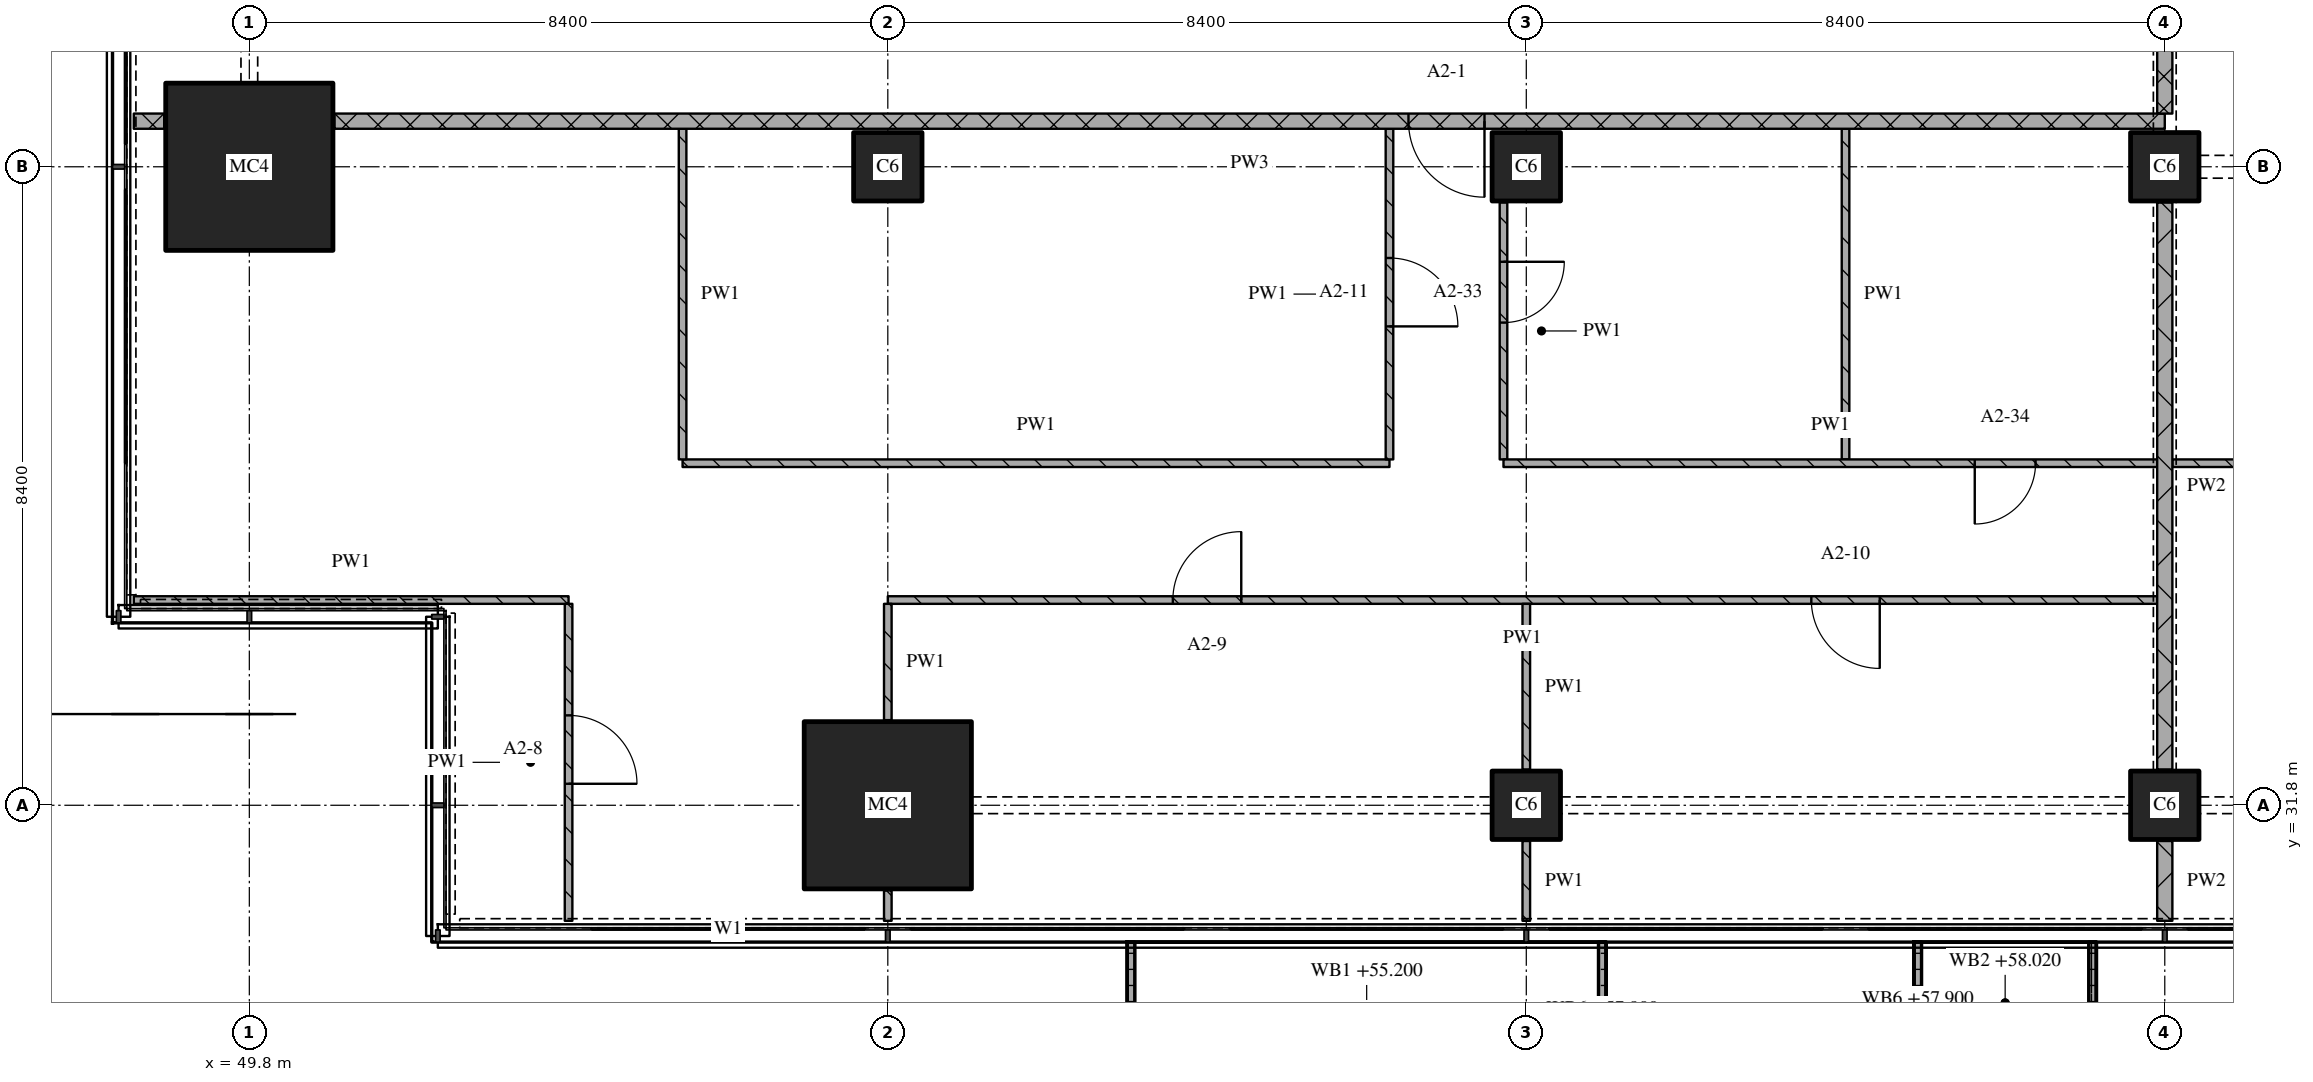
"""IFC4 building model, lengths in metres.
Left out: names, types, materials, properties, quantities, classifications, styles, units other than length and angle.
Written with IfcOpenShell. Run it as: python <this file> out.ifc"""

import sys

from ifc_helpers import new_model, si_unit, direction, frame, frame_2d, origin, origin_2d, place, context, subcontext, project, spatial, polyline, rectangle, outline, extrude, element, fill, save


model = new_model("IFC4")
c1 = context("Model", 3, precision=1e-05, world=origin(), true_north=direction((0.0, 1.0)))
c2 = subcontext(c1, "Body", "Model", "MODEL_VIEW")
j1 = project(units=[si_unit("LENGTHUNIT", "METRE"), si_unit("PLANEANGLEUNIT", "RADIAN")], contexts=[c1])
p1 = place(None, origin())
s1 = spatial("IfcSite", under=j1, at=p1, CompositionType="ELEMENT")
p2 = place(p1, origin())
s2 = spatial("IfcBuilding", under=s1, at=p2, CompositionType="ELEMENT")
p3 = place(p2, frame((0.0, 0.0, 55.2)))
s3 = spatial("IfcBuildingStorey", under=s2, at=p3, CompositionType="ELEMENT", Elevation=55.2)
for number, where, z_axis, x_axis in (
    (1, (49.8, 40.2, 0.0), (0.0, 0.0, 1.0), (1.0, 0.0, 0.0)),
    (2, (58.2, 31.8, 0.0), (0.0, 0.0, 1.0), (1.0, 0.0, 0.0)),
):
    element("IfcColumn", number, at=place(p3, frame(where, z_axis=z_axis, x_axis=x_axis)), inside=s3, PredefinedType="COLUMN", context=c2, shape_type="SweptSolid", body=[
        extrude(rectangle(XDim=2.2, YDim=2.2, at=origin_2d()), origin(), (0.0, 0.0, 1.0), 3.6),
    ])
for number, where, z_axis, x_axis in (
    (3, (58.2, 40.2, 0.0), (0.0, 0.0, 1.0), (1.0, 0.0, 0.0)),
    (4, (66.6, 31.8, 0.0), (0.0, 0.0, 1.0), (1.0, 0.0, 0.0)),
    (5, (66.6, 40.2, 0.0), (0.0, 0.0, 1.0), (1.0, 0.0, 0.0)),
    (6, (75.0, 31.8, 0.0), (0.0, 0.0, 1.0), (1.0, 0.0, 0.0)),
    (7, (75.0, 40.2, 0.0), (0.0, 0.0, 1.0), (1.0, 0.0, 0.0)),
):
    element("IfcColumn", number, at=place(p3, frame(where, z_axis=z_axis, x_axis=x_axis)), inside=s3, PredefinedType="COLUMN", context=c2, shape_type="SweptSolid", body=[
        extrude(rectangle(XDim=0.9, YDim=0.9, at=origin_2d()), origin(), (0.0, 0.0, 1.0), 3.6),
    ])
p4 = place(p3, origin())
e8 = element("IfcWall", 8, at=p4, inside=s3, PredefinedType="SOLIDWALL", context=c2, shape_type="SweptSolid", body=[
    extrude(outline(polyline([(61.35, 30.0), (61.45, 30.0), (61.45, 28.233), (67.55, 28.233), (67.55, 30.0), (67.65, 30.0), (67.65, 28.133), (61.35, 28.133), (61.35, 30.0)])), origin(), (0.0, 0.0, 1.0), 1.0),
])
p5 = place(p3, origin())
e9 = element("IfcWall", 9, at=p5, inside=s3, PredefinedType="SOLIDWALL", context=c2, shape_type="SweptSolid", body=[
    extrude(outline(polyline([(71.7, 30.0), (71.8, 30.0), (71.8, 28.5), (74.0, 28.5), (74.0, 30.0), (74.1, 30.0), (74.1, 28.4), (71.7, 28.4), (71.7, 30.0)])), origin(), (0.0, 0.0, 1.0), 1.0),
])
p6 = place(p3, frame((48.28, 34.5, 0.0), z_axis=(0.0, 0.0, 1.0), x_axis=(1.0, 0.0, 0.0)))
e10 = element("IfcWall", 10, at=p6, inside=s3, PredefinedType="PARTITIONING", context=c2, shape_type="SweptSolid", body=[
    extrude(rectangle(XDim=5.72, YDim=0.1, at=frame_2d((2.86, 0.0))), origin(), (0.0, 0.0, 1.0), 3.32),
])
p7 = place(p3, frame((74.9, 34.5, 0.0), z_axis=(0.0, 0.0, 1.0), x_axis=(-1.0, 0.0, 0.0)))
e11 = element("IfcWall", 11, at=p7, inside=s3, PredefinedType="PARTITIONING", context=c2, shape_type="SweptSolid", body=[
    extrude(rectangle(XDim=16.7, YDim=0.1, at=frame_2d((8.35, 0.0))), origin(), (0.0, 0.0, 1.0), 3.32),
])
p8 = place(p7, frame((3.65, 0.0, 0.0)))
e12 = element("IfcOpeningElement", 12, at=p8, cuts=e11, PredefinedType="OPENING", context=c2, shape_type="SweptSolid", body=[
    extrude(rectangle(XDim=0.9, YDim=2.1, at=frame_2d((0.45, 1.05))), frame((0.0, 0.06, 0.0), z_axis=(0.0, -1.0, 0.0), x_axis=(1.0, 0.0, 0.0)), (0.0, 0.0, 1.0), 0.12),
])
p9 = place(p7, frame((12.05, 0.0, 0.0)))
e13 = element("IfcOpeningElement", 13, at=p9, cuts=e11, PredefinedType="OPENING", context=c2, shape_type="SweptSolid", body=[
    extrude(rectangle(XDim=0.9, YDim=2.1, at=frame_2d((0.45, 1.05))), frame((0.0, 0.06, 0.0), z_axis=(0.0, -1.0, 0.0), x_axis=(1.0, 0.0, 0.0)), (0.0, 0.0, 1.0), 0.12),
])
p10 = place(p3, frame((55.5, 36.3, 0.0), z_axis=(0.0, 0.0, 1.0), x_axis=(1.0, 0.0, 0.0)))
e14 = element("IfcWall", 14, at=p10, inside=s3, PredefinedType="PARTITIONING", context=c2, shape_type="SweptSolid", body=[
    extrude(rectangle(XDim=9.3, YDim=0.1, at=frame_2d((4.65, 0.0))), origin(), (0.0, 0.0, 1.0), 3.32),
])
p11 = place(p3, frame((48.28, 40.8, 0.0), z_axis=(0.0, 0.0, 1.0), x_axis=(1.0, 0.0, 0.0)))
e15 = element("IfcWall", 15, at=p11, inside=s3, PredefinedType="PARTITIONING", context=c2, shape_type="SweptSolid", body=[
    extrude(rectangle(XDim=0.4, YDim=0.2, at=frame_2d((0.2, 0.0))), origin(), (0.0, 0.0, 1.0), 3.32),
])
p12 = place(p3, frame((75.0, 40.8, 0.0), z_axis=(0.0, 0.0, 1.0), x_axis=(-1.0, 0.0, 0.0)))
e16 = element("IfcWall", 16, at=p12, inside=s3, PredefinedType="PARTITIONING", context=c2, shape_type="SweptSolid", body=[
    extrude(rectangle(XDim=24.08, YDim=0.2, at=frame_2d((12.04, 0.0))), origin(), (0.0, 0.0, 1.0), 3.32),
])
p13 = place(p12, frame((8.95, 0.0, 0.0)))
e17 = element("IfcOpeningElement", 17, at=p13, cuts=e16, PredefinedType="OPENING", context=c2, shape_type="SweptSolid", body=[
    extrude(rectangle(XDim=1.0, YDim=2.1, at=frame_2d((0.5, 1.05))), frame((0.0, 0.11, 0.0), z_axis=(0.0, -1.0, 0.0), x_axis=(1.0, 0.0, 0.0)), (0.0, 0.0, 1.0), 0.22),
])
p14 = place(p3, frame((54.0, 30.28, 0.0), z_axis=(0.0, 0.0, 1.0), x_axis=(0.0, 1.0, 0.0)))
e18 = element("IfcWall", 18, at=p14, inside=s3, PredefinedType="PARTITIONING", context=c2, shape_type="SweptSolid", body=[
    extrude(rectangle(XDim=4.17, YDim=0.1, at=frame_2d((2.085, 0.0))), origin(), (0.0, 0.0, 1.0), 3.32),
])
p15 = place(p14, frame((1.803, 0.0, 0.0)))
e19 = element("IfcOpeningElement", 19, at=p15, cuts=e18, PredefinedType="OPENING", context=c2, shape_type="SweptSolid", body=[
    extrude(rectangle(XDim=0.9, YDim=2.1, at=frame_2d((0.45, 1.05))), frame((0.0, 0.06, 0.0), z_axis=(0.0, -1.0, 0.0), x_axis=(1.0, 0.0, 0.0)), (0.0, 0.0, 1.0), 0.12),
])
p16 = place(p3, frame((55.5, 40.7, 0.0), z_axis=(0.0, 0.0, 1.0), x_axis=(0.0, -1.0, 0.0)))
e20 = element("IfcWall", 20, at=p16, inside=s3, PredefinedType="PARTITIONING", context=c2, shape_type="SweptSolid", body=[
    extrude(rectangle(XDim=4.35, YDim=0.1, at=frame_2d((2.175, 0.0))), origin(), (0.0, 0.0, 1.0), 3.32),
])
p17 = place(p3, frame((58.2, 30.68, 0.0), z_axis=(0.0, 0.0, 1.0), x_axis=(0.0, -1.0, 0.0)))
e21 = element("IfcWall", 21, at=p17, inside=s3, PredefinedType="PARTITIONING", context=c2, shape_type="SweptSolid", body=[
    extrude(rectangle(XDim=0.4, YDim=0.1, at=frame_2d((0.2, 0.0))), origin(), (0.0, 0.0, 1.0), 3.32),
])
p18 = place(p3, frame((58.2, 34.45, 0.0), z_axis=(0.0, 0.0, 1.0), x_axis=(0.0, -1.0, 0.0)))
e22 = element("IfcWall", 22, at=p18, inside=s3, PredefinedType="PARTITIONING", context=c2, shape_type="SweptSolid", body=[
    extrude(rectangle(XDim=1.53, YDim=0.1, at=frame_2d((0.765, 0.0))), origin(), (0.0, 0.0, 1.0), 3.32),
])
p19 = place(p3, frame((64.8, 36.35, 0.0), z_axis=(0.0, 0.0, 1.0), x_axis=(0.0, 1.0, 0.0)))
e23 = element("IfcWall", 23, at=p19, inside=s3, PredefinedType="PARTITIONING", context=c2, shape_type="SweptSolid", body=[
    extrude(rectangle(XDim=4.35, YDim=0.1, at=frame_2d((2.175, 0.0))), origin(), (0.0, 0.0, 1.0), 3.32),
])
p20 = place(p19, frame((1.75, 0.0, 0.0)))
e24 = element("IfcOpeningElement", 24, at=p20, cuts=e23, PredefinedType="OPENING", context=c2, shape_type="SweptSolid", body=[
    extrude(rectangle(XDim=0.9, YDim=2.1, at=frame_2d((0.45, 1.05))), frame((0.0, 0.06, 0.0), z_axis=(0.0, -1.0, 0.0), x_axis=(1.0, 0.0, 0.0)), (0.0, 0.0, 1.0), 0.12),
])
p21 = place(p3, frame((66.3, 39.73, 0.0), z_axis=(0.0, 0.0, 1.0), x_axis=(0.0, -1.0, 0.0)))
e25 = element("IfcWall", 25, at=p21, inside=s3, PredefinedType="PARTITIONING", context=c2, shape_type="SweptSolid", body=[
    extrude(rectangle(XDim=3.38, YDim=0.1, at=frame_2d((1.69, 0.0))), origin(), (0.0, 0.0, 1.0), 3.32),
])
p22 = place(p21, frame((0.78, 0.0, 0.0)))
e26 = element("IfcOpeningElement", 26, at=p22, cuts=e25, PredefinedType="OPENING", context=c2, shape_type="SweptSolid", body=[
    extrude(rectangle(XDim=0.8, YDim=2.1, at=frame_2d((0.4, 1.05))), frame((0.0, 0.06, 0.0), z_axis=(0.0, -1.0, 0.0), x_axis=(1.0, 0.0, 0.0)), (0.0, 0.0, 1.0), 0.12),
])
p23 = place(p3, frame((66.6, 31.33, 0.0), z_axis=(0.0, 0.0, 1.0), x_axis=(0.0, -1.0, 0.0)))
e27 = element("IfcWall", 27, at=p23, inside=s3, PredefinedType="PARTITIONING", context=c2, shape_type="SweptSolid", body=[
    extrude(rectangle(XDim=1.05, YDim=0.1, at=frame_2d((0.525, 0.0))), origin(), (0.0, 0.0, 1.0), 3.32),
])
p24 = place(p3, frame((66.6, 34.45, 0.0), z_axis=(0.0, 0.0, 1.0), x_axis=(0.0, -1.0, 0.0)))
e28 = element("IfcWall", 28, at=p24, inside=s3, PredefinedType="PARTITIONING", context=c2, shape_type="SweptSolid", body=[
    extrude(rectangle(XDim=2.18, YDim=0.1, at=frame_2d((1.09, 0.0))), origin(), (0.0, 0.0, 1.0), 3.32),
])
p25 = place(p3, frame((70.8, 40.7, 0.0), z_axis=(0.0, 0.0, 1.0), x_axis=(0.0, -1.0, 0.0)))
e29 = element("IfcWall", 29, at=p25, inside=s3, PredefinedType="PARTITIONING", context=c2, shape_type="SweptSolid", body=[
    extrude(rectangle(XDim=4.35, YDim=0.1, at=frame_2d((2.175, 0.0))), origin(), (0.0, 0.0, 1.0), 3.32),
])
p26 = place(p3, frame((75.0, 43.1, 0.0), z_axis=(0.0, 0.0, 1.0), x_axis=(0.0, -1.0, 0.0)))
e30 = element("IfcWall", 30, at=p26, inside=s3, PredefinedType="PARTITIONING", context=c2, shape_type="SweptSolid", body=[
    extrude(rectangle(XDim=2.2, YDim=0.2, at=frame_2d((1.1, 0.0))), origin(), (0.0, 0.0, 1.0), 2.43),
])
p27 = place(p3, frame((75.0, 31.33, 0.0), z_axis=(0.0, 0.0, 1.0), x_axis=(0.0, -1.0, 0.0)))
e31 = element("IfcWall", 31, at=p27, inside=s3, PredefinedType="PARTITIONING", context=c2, shape_type="SweptSolid", body=[
    extrude(rectangle(XDim=1.05, YDim=0.2, at=frame_2d((0.525, 0.0))), origin(), (0.0, 0.0, 1.0), 3.32),
])
p28 = place(p3, frame((75.0, 39.73, 0.0), z_axis=(0.0, 0.0, 1.0), x_axis=(0.0, -1.0, 0.0)))
e32 = element("IfcWall", 32, at=p28, inside=s3, PredefinedType="PARTITIONING", context=c2, shape_type="SweptSolid", body=[
    extrude(rectangle(XDim=7.46, YDim=0.2, at=frame_2d((3.73, 0.0))), origin(), (0.0, 0.0, 1.0), 2.83),
])
p29 = place(p3, frame((66.3, 36.3, 0.0), z_axis=(0.0, 0.0, 1.0), x_axis=(1.0, 0.0, 0.0)))
e33 = element("IfcWall", 33, at=p29, inside=s3, PredefinedType="PARTITIONING", context=c2, shape_type="SweptSolid", body=[
    extrude(rectangle(XDim=8.6, YDim=0.1, at=frame_2d((4.3, 0.0))), origin(), (0.0, 0.0, 1.0), 3.32),
])
p30 = place(p29, frame((6.2, 0.0, 0.0)))
e34 = element("IfcOpeningElement", 34, at=p30, cuts=e33, PredefinedType="OPENING", context=c2, shape_type="SweptSolid", body=[
    extrude(rectangle(XDim=0.8, YDim=2.1, at=frame_2d((0.4, 1.05))), frame((0.0, 0.06, 0.0), z_axis=(0.0, -1.0, 0.0), x_axis=(1.0, 0.0, 0.0)), (0.0, 0.0, 1.0), 0.12),
])
p31 = place(p3, frame((75.1, 36.3, 0.0), z_axis=(0.0, 0.0, 1.0), x_axis=(1.0, 0.0, 0.0)))
e35 = element("IfcWall", 35, at=p31, inside=s3, PredefinedType="PARTITIONING", context=c2, shape_type="SweptSolid", body=[
    extrude(rectangle(XDim=8.3, YDim=0.1, at=frame_2d((4.15, 0.0))), origin(), (0.0, 0.0, 1.0), 3.32),
])
p32 = place(p8, origin())
e36 = element("IfcDoor", 36, at=p32, inside=s3, OperationType="SINGLE_SWING_LEFT", PredefinedType="DOOR", context=c2, shape_type="SweptSolid", body=[
    extrude(rectangle(XDim=0.9, YDim=2.1, at=frame_2d((0.45, 1.05))), frame((0.0, 0.025, 0.0), z_axis=(0.0, -1.0, 0.0), x_axis=(1.0, 0.0, 0.0)), (0.0, 0.0, 1.0), 0.05),
])
fill(e12, e36)
p33 = place(p9, origin())
e37 = element("IfcDoor", 37, at=p33, inside=s3, OperationType="SINGLE_SWING_RIGHT", PredefinedType="DOOR", context=c2, shape_type="SweptSolid", body=[
    extrude(rectangle(XDim=0.9, YDim=2.1, at=frame_2d((0.45, 1.05))), frame((0.0, 0.025, 0.0), z_axis=(0.0, -1.0, 0.0), x_axis=(1.0, 0.0, 0.0)), (0.0, 0.0, 1.0), 0.05),
])
fill(e13, e37)
p34 = place(p13, origin())
e38 = element("IfcDoor", 38, at=p34, inside=s3, OperationType="SINGLE_SWING_LEFT", PredefinedType="DOOR", context=c2, shape_type="SweptSolid", body=[
    extrude(rectangle(XDim=1.0, YDim=2.1, at=frame_2d((0.5, 1.05))), frame((0.0, 0.025, 0.0), z_axis=(0.0, -1.0, 0.0), x_axis=(1.0, 0.0, 0.0)), (0.0, 0.0, 1.0), 0.05),
])
fill(e17, e38)
p35 = place(p15, origin())
e39 = element("IfcDoor", 39, at=p35, inside=s3, OperationType="SINGLE_SWING_RIGHT", PredefinedType="DOOR", context=c2, shape_type="SweptSolid", body=[
    extrude(rectangle(XDim=0.9, YDim=2.1, at=frame_2d((0.45, 1.05))), frame((0.0, 0.025, 0.0), z_axis=(0.0, -1.0, 0.0), x_axis=(1.0, 0.0, 0.0)), (0.0, 0.0, 1.0), 0.05),
])
fill(e19, e39)
p36 = place(p20, origin())
e40 = element("IfcDoor", 40, at=p36, inside=s3, OperationType="SINGLE_SWING_RIGHT", PredefinedType="DOOR", context=c2, shape_type="SweptSolid", body=[
    extrude(rectangle(XDim=0.9, YDim=2.1, at=frame_2d((0.45, 1.05))), frame((0.0, 0.025, 0.0), z_axis=(0.0, -1.0, 0.0), x_axis=(1.0, 0.0, 0.0)), (0.0, 0.0, 1.0), 0.05),
])
fill(e24, e40)
p37 = place(p22, origin())
e41 = element("IfcDoor", 41, at=p37, inside=s3, OperationType="SINGLE_SWING_LEFT", PredefinedType="DOOR", context=c2, shape_type="SweptSolid", body=[
    extrude(rectangle(XDim=0.8, YDim=2.1, at=frame_2d((0.4, 1.05))), frame((0.0, 0.025, 0.0), z_axis=(0.0, -1.0, 0.0), x_axis=(1.0, 0.0, 0.0)), (0.0, 0.0, 1.0), 0.05),
])
fill(e26, e41)
p38 = place(p30, origin())
e42 = element("IfcDoor", 42, at=p38, inside=s3, OperationType="SINGLE_SWING_RIGHT", PredefinedType="DOOR", context=c2, shape_type="SweptSolid", body=[
    extrude(rectangle(XDim=0.8, YDim=2.1, at=frame_2d((0.4, 1.05))), frame((0.0, 0.025, 0.0), z_axis=(0.0, -1.0, 0.0), x_axis=(1.0, 0.0, 0.0)), (0.0, 0.0, 1.0), 0.05),
])
fill(e34, e42)
save(model, sys.argv[1])
